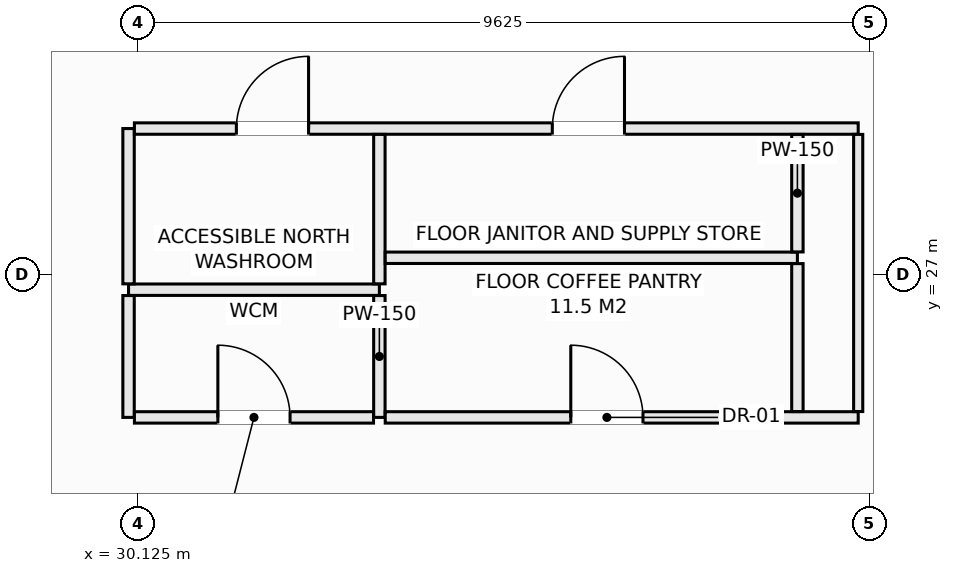
"""IFC4 building model, lengths in metres.
Left out: names, types, materials, properties, quantities, classifications, styles, units other than length and angle.
Written with IfcOpenShell. Run it as: python <this file> out.ifc"""

import sys

from ifc_helpers import new_model, si_unit, direction, frame, frame_2d, origin, place, context, subcontext, project, spatial, rectangle, extrude, element, fill, save


model = new_model("IFC4")
c1 = context("Model", 3, precision=1e-05, world=origin(), true_north=direction((0.0, 1.0)))
c2 = subcontext(c1, "Body", "Model", "MODEL_VIEW")
j1 = project(units=[si_unit("LENGTHUNIT", "METRE"), si_unit("PLANEANGLEUNIT", "RADIAN")], contexts=[c1])
p1 = place(None, origin())
s1 = spatial("IfcSite", under=j1, at=p1, CompositionType="ELEMENT")
p2 = place(p1, origin())
s2 = spatial("IfcBuilding", under=s1, at=p2, CompositionType="ELEMENT")
p3 = place(p2, frame((0.0, 0.0, 262.4)))
s3 = spatial("IfcBuildingStorey", under=s2, at=p3, CompositionType="ELEMENT", Elevation=262.4)
p4 = place(p3, frame((30.0, 26.8, 0.0), z_axis=(0.0, 0.0, 1.0), x_axis=(1.0, 0.0, 0.0)))
e1 = element("IfcWall", 1, at=p4, inside=s3, PredefinedType="PARTITIONING", context=c2, shape_type="SweptSolid", body=[
    extrude(rectangle(XDim=3.3, YDim=0.15, at=frame_2d((1.65, 0.0))), origin(), (0.0, 0.0, 1.0), 3.03),
])
p5 = place(p3, frame((30.0, 25.12, 0.0), z_axis=(0.0, 0.0, 1.0), x_axis=(0.0, 1.0, 0.0)))
e2 = element("IfcWall", 2, at=p5, inside=s3, PredefinedType="PARTITIONING", context=c2, shape_type="SweptSolid", body=[
    extrude(rectangle(XDim=1.603, YDim=0.15, at=frame_2d((0.801, 0.0))), origin(), (0.0, 0.0, 1.0), 3.03),
])
p6 = place(p3, frame((30.0, 26.877, 0.0), z_axis=(0.0, 0.0, 1.0), x_axis=(0.0, 1.0, 0.0)))
e3 = element("IfcWall", 3, at=p6, inside=s3, PredefinedType="PARTITIONING", context=c2, shape_type="SweptSolid", body=[
    extrude(rectangle(XDim=2.043, YDim=0.15, at=frame_2d((1.021, 0.0))), origin(), (0.0, 0.0, 1.0), 3.03),
])
p7 = place(p3, frame((30.077, 28.92, 0.0), z_axis=(0.0, 0.0, 1.0), x_axis=(1.0, 0.0, 0.0)))
e4 = element("IfcWall", 4, at=p7, inside=s3, PredefinedType="PARTITIONING", context=c2, shape_type="SweptSolid", body=[
    extrude(rectangle(XDim=9.523, YDim=0.15, at=frame_2d((4.762, 0.0))), origin(), (0.0, 0.0, 1.0), 3.03),
])
p8 = place(p7, frame((1.342, 0.0, 0.0)))
e5 = element("IfcOpeningElement", 5, at=p8, cuts=e4, PredefinedType="OPENING", context=c2, shape_type="SweptSolid", body=[
    extrude(rectangle(XDim=0.95, YDim=2.1, at=frame_2d((0.475, 1.05))), frame((0.0, 0.085, 0.0), z_axis=(0.0, -1.0, 0.0), x_axis=(1.0, 0.0, 0.0)), (0.0, 0.0, 1.0), 0.17),
])
p9 = place(p7, frame((5.498, 0.0, 0.0)))
e6 = element("IfcOpeningElement", 6, at=p9, cuts=e4, PredefinedType="OPENING", context=c2, shape_type="SweptSolid", body=[
    extrude(rectangle(XDim=0.95, YDim=2.1, at=frame_2d((0.475, 1.05))), frame((0.0, 0.085, 0.0), z_axis=(0.0, -1.0, 0.0), x_axis=(1.0, 0.0, 0.0)), (0.0, 0.0, 1.0), 0.17),
])
p10 = place(p3, frame((33.3, 25.12, 0.0), z_axis=(0.0, 0.0, 1.0), x_axis=(0.0, 1.0, 0.0)))
e7 = element("IfcWall", 7, at=p10, inside=s3, PredefinedType="PARTITIONING", context=c2, shape_type="SweptSolid", body=[
    extrude(rectangle(XDim=1.603, YDim=0.15, at=frame_2d((0.801, 0.0))), origin(), (0.0, 0.0, 1.0), 3.03),
])
p11 = place(p3, frame((33.3, 26.877, 0.0), z_axis=(0.0, 0.0, 1.0), x_axis=(0.0, 1.0, 0.0)))
e8 = element("IfcWall", 8, at=p11, inside=s3, PredefinedType="PARTITIONING", context=c2, shape_type="SweptSolid", body=[
    extrude(rectangle(XDim=1.966, YDim=0.15, at=frame_2d((0.983, 0.0))), origin(), (0.0, 0.0, 1.0), 3.03),
])
p12 = place(p3, frame((30.077, 25.12, 0.0), z_axis=(0.0, 0.0, 1.0), x_axis=(1.0, 0.0, 0.0)))
e9 = element("IfcWall", 9, at=p12, inside=s3, PredefinedType="PARTITIONING", context=c2, shape_type="SweptSolid", body=[
    extrude(rectangle(XDim=3.146, YDim=0.15, at=frame_2d((1.573, 0.0))), origin(), (0.0, 0.0, 1.0), 3.03),
])
p13 = place(p12, frame((1.098, 0.0, 0.0)))
e10 = element("IfcOpeningElement", 10, at=p13, cuts=e9, PredefinedType="OPENING", context=c2, shape_type="SweptSolid", body=[
    extrude(rectangle(XDim=0.95, YDim=2.1, at=frame_2d((0.475, 1.05))), frame((0.0, 0.085, 0.0), z_axis=(0.0, -1.0, 0.0), x_axis=(1.0, 0.0, 0.0)), (0.0, 0.0, 1.0), 0.17),
])
p14 = place(p3, frame((33.377, 25.12, 0.0), z_axis=(0.0, 0.0, 1.0), x_axis=(1.0, 0.0, 0.0)))
e11 = element("IfcWall", 11, at=p14, inside=s3, PredefinedType="PARTITIONING", context=c2, shape_type="SweptSolid", body=[
    extrude(rectangle(XDim=6.223, YDim=0.15, at=frame_2d((3.112, 0.0))), origin(), (0.0, 0.0, 1.0), 3.03),
])
p15 = place(p14, frame((2.441, 0.0, 0.0)))
e12 = element("IfcOpeningElement", 12, at=p15, cuts=e11, PredefinedType="OPENING", context=c2, shape_type="SweptSolid", body=[
    extrude(rectangle(XDim=0.95, YDim=2.1, at=frame_2d((0.475, 1.05))), frame((0.0, 0.085, 0.0), z_axis=(0.0, -1.0, 0.0), x_axis=(1.0, 0.0, 0.0)), (0.0, 0.0, 1.0), 0.17),
])
p16 = place(p3, frame((33.377, 27.22, 0.0), z_axis=(0.0, 0.0, 1.0), x_axis=(1.0, 0.0, 0.0)))
e13 = element("IfcWall", 13, at=p16, inside=s3, PredefinedType="PARTITIONING", context=c2, shape_type="SweptSolid", body=[
    extrude(rectangle(XDim=5.423, YDim=0.15, at=frame_2d((2.711, 0.0))), origin(), (0.0, 0.0, 1.0), 3.03),
])
p17 = place(p3, frame((38.8, 25.197, 0.0), z_axis=(0.0, 0.0, 1.0), x_axis=(0.0, 1.0, 0.0)))
e14 = element("IfcWall", 14, at=p17, inside=s3, PredefinedType="PARTITIONING", context=c2, shape_type="SweptSolid", body=[
    extrude(rectangle(XDim=1.946, YDim=0.15, at=frame_2d((0.973, 0.0))), origin(), (0.0, 0.0, 1.0), 3.03),
])
p18 = place(p3, frame((38.8, 27.297, 0.0), z_axis=(0.0, 0.0, 1.0), x_axis=(0.0, 1.0, 0.0)))
e15 = element("IfcWall", 15, at=p18, inside=s3, PredefinedType="PARTITIONING", context=c2, shape_type="SweptSolid", body=[
    extrude(rectangle(XDim=1.546, YDim=0.15, at=frame_2d((0.773, 0.0))), origin(), (0.0, 0.0, 1.0), 3.03),
])
p19 = place(p3, frame((39.6, 25.197, 0.0), z_axis=(0.0, 0.0, 1.0), x_axis=(0.0, 1.0, 0.0)))
e16 = element("IfcWall", 16, at=p19, inside=s3, PredefinedType="PARTITIONING", context=c2, shape_type="SweptSolid", body=[
    extrude(rectangle(XDim=3.646, YDim=0.12, at=frame_2d((1.823, 0.0))), origin(), (0.0, 0.0, 1.0), 3.03),
])
p20 = place(p8, origin())
e17 = element("IfcDoor", 17, at=p20, inside=s3, OperationType="SINGLE_SWING_RIGHT", PredefinedType="DOOR", context=c2, shape_type="SweptSolid", body=[
    extrude(rectangle(XDim=0.95, YDim=2.1, at=frame_2d((0.475, 1.05))), frame((0.0, 0.025, 0.0), z_axis=(0.0, -1.0, 0.0), x_axis=(1.0, 0.0, 0.0)), (0.0, 0.0, 1.0), 0.05),
])
fill(e5, e17)
p21 = place(p13, origin())
e18 = element("IfcDoor", 18, at=p21, inside=s3, OperationType="SINGLE_SWING_LEFT", PredefinedType="DOOR", context=c2, shape_type="SweptSolid", body=[
    extrude(rectangle(XDim=0.95, YDim=2.1, at=frame_2d((0.475, 1.05))), frame((0.0, 0.025, 0.0), z_axis=(0.0, -1.0, 0.0), x_axis=(1.0, 0.0, 0.0)), (0.0, 0.0, 1.0), 0.05),
])
fill(e10, e18)
p22 = place(p9, origin())
e19 = element("IfcDoor", 19, at=p22, inside=s3, OperationType="SINGLE_SWING_RIGHT", PredefinedType="DOOR", context=c2, shape_type="SweptSolid", body=[
    extrude(rectangle(XDim=0.95, YDim=2.1, at=frame_2d((0.475, 1.05))), frame((0.0, 0.025, 0.0), z_axis=(0.0, -1.0, 0.0), x_axis=(1.0, 0.0, 0.0)), (0.0, 0.0, 1.0), 0.05),
])
fill(e6, e19)
p23 = place(p15, origin())
e20 = element("IfcDoor", 20, at=p23, inside=s3, OperationType="SINGLE_SWING_LEFT", PredefinedType="DOOR", context=c2, shape_type="SweptSolid", body=[
    extrude(rectangle(XDim=0.95, YDim=2.1, at=frame_2d((0.475, 1.05))), frame((0.0, 0.025, 0.0), z_axis=(0.0, -1.0, 0.0), x_axis=(1.0, 0.0, 0.0)), (0.0, 0.0, 1.0), 0.05),
])
fill(e12, e20)
save(model, sys.argv[1])
